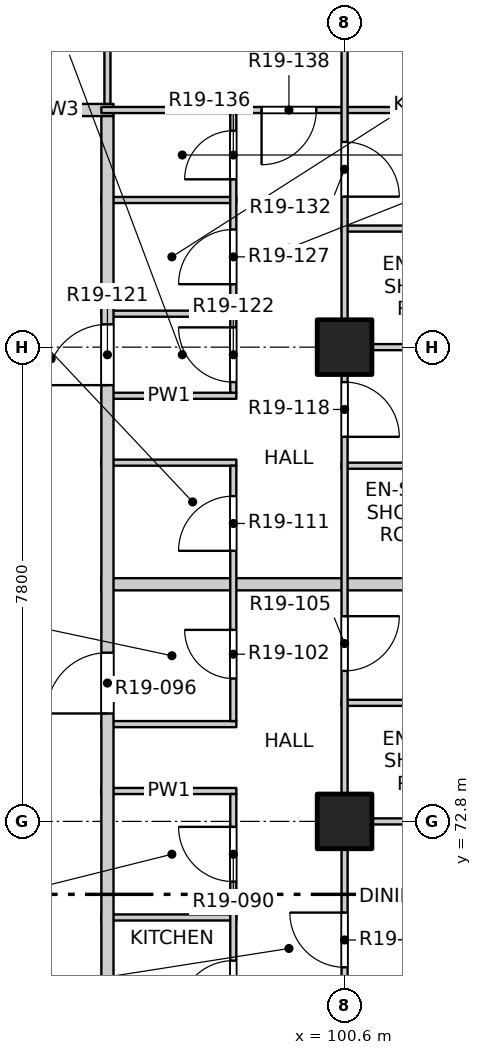
"""IFC4 building model, lengths in metres.
Left out: names, types, materials, properties, quantities, classifications, styles, units other than length and angle.
Written with IfcOpenShell. Run it as: python <this file> out.ifc"""

import sys

from ifc_helpers import new_model, si_unit, direction, frame, frame_2d, origin, origin_2d, place, context, subcontext, project, spatial, rectangle, extrude, element, fill, save


model = new_model("IFC4")
c1 = context("Model", 3, precision=1e-05, world=origin(), true_north=direction((0.0, 1.0)))
c2 = subcontext(c1, "Body", "Model", "MODEL_VIEW")
j1 = project(units=[si_unit("LENGTHUNIT", "METRE"), si_unit("PLANEANGLEUNIT", "RADIAN")], contexts=[c1])
p1 = place(None, origin())
s1 = spatial("IfcSite", under=j1, at=p1, CompositionType="ELEMENT")
p2 = place(p1, origin())
s2 = spatial("IfcBuilding", under=s1, at=p2, CompositionType="ELEMENT")
p3 = place(p2, frame((0.0, 0.0, 197.3)))
s3 = spatial("IfcBuildingStorey", under=s2, at=p3, CompositionType="ELEMENT", Elevation=197.3)
for number, where, z_axis, x_axis in (
    (1, (100.6, 72.8, -0.3), (0.0, 0.0, 1.0), (1.0, 0.0, 0.0)),
    (2, (100.6, 80.6, -0.3), (0.0, 0.0, 1.0), (1.0, 0.0, 0.0)),
):
    element("IfcColumn", number, at=place(p3, frame(where, z_axis=z_axis, x_axis=x_axis)), inside=s3, PredefinedType="COLUMN", context=c2, shape_type="SweptSolid", body=[
        extrude(rectangle(XDim=0.9, YDim=0.9, at=origin_2d()), origin(), (0.0, 0.0, 1.0), 3.45),
    ])
p4 = place(p3, frame((96.6, 71.22, 0.0), z_axis=(0.0, 0.0, 1.0), x_axis=(1.0, 0.0, 0.0)))
e3 = element("IfcWall", 3, at=p4, inside=s3, PredefinedType="PARTITIONING", context=c2, shape_type="SweptSolid", body=[
    extrude(rectangle(XDim=2.22, YDim=0.1, at=frame_2d((1.11, 0.0))), origin(), (0.0, 0.0, 1.0), 3.15),
])
p5 = place(p3, frame((100.55, 72.8, 0.0), z_axis=(0.0, 0.0, 1.0), x_axis=(1.0, 0.0, 0.0)))
e4 = element("IfcWall", 4, at=p5, inside=s3, PredefinedType="PARTITIONING", context=c2, shape_type="SweptSolid", body=[
    extrude(rectangle(XDim=7.55, YDim=0.1, at=frame_2d((3.775, 0.0))), origin(), (0.0, 0.0, 1.0), 3.15),
])
for number, where, z_axis, x_axis in (
    (5, (96.6, 73.3, 0.0), (0.0, 0.0, 1.0), (1.0, 0.0, 0.0)),
    (6, (96.6, 74.4, 0.0), (0.0, 0.0, 1.0), (1.0, 0.0, 0.0)),
):
    element("IfcWall", number, at=place(p3, frame(where, z_axis=z_axis, x_axis=x_axis)), inside=s3, PredefinedType="PARTITIONING", context=c2, shape_type="SweptSolid", body=[
        extrude(rectangle(XDim=2.22, YDim=0.1, at=frame_2d((1.11, 0.0))), origin(), (0.0, 0.0, 1.0), 3.15),
    ])
p6 = place(p3, frame((100.55, 74.75, 0.0), z_axis=(0.0, 0.0, 1.0), x_axis=(1.0, 0.0, 0.0)))
e7 = element("IfcWall", 7, at=p6, inside=s3, PredefinedType="PARTITIONING", context=c2, shape_type="SweptSolid", body=[
    extrude(rectangle(XDim=3.4, YDim=0.1, at=frame_2d((1.7, 0.0))), origin(), (0.0, 0.0, 1.0), 3.15),
])
p7 = place(p3, frame((96.6, 76.7, 0.0), z_axis=(0.0, 0.0, 1.0), x_axis=(1.0, 0.0, 0.0)))
e8 = element("IfcWall", 8, at=p7, inside=s3, PredefinedType="PARTITIONING", context=c2, shape_type="SweptSolid", body=[
    extrude(rectangle(XDim=11.5, YDim=0.2, at=frame_2d((5.75, 0.0))), origin(), (0.0, 0.0, 1.0), 2.55),
])
p8 = place(p3, frame((100.55, 78.65, 0.0), z_axis=(0.0, 0.0, 1.0), x_axis=(1.0, 0.0, 0.0)))
e9 = element("IfcWall", 9, at=p8, inside=s3, PredefinedType="PARTITIONING", context=c2, shape_type="SweptSolid", body=[
    extrude(rectangle(XDim=3.4, YDim=0.1, at=frame_2d((1.7, 0.0))), origin(), (0.0, 0.0, 1.0), 3.15),
])
for number, where, z_axis, x_axis in (
    (10, (96.6, 78.7, 0.0), (0.0, 0.0, 1.0), (1.0, 0.0, 0.0)),
    (11, (96.6, 79.8, 0.0), (0.0, 0.0, 1.0), (1.0, 0.0, 0.0)),
):
    element("IfcWall", number, at=place(p3, frame(where, z_axis=z_axis, x_axis=x_axis)), inside=s3, PredefinedType="PARTITIONING", context=c2, shape_type="SweptSolid", body=[
        extrude(rectangle(XDim=2.22, YDim=0.1, at=frame_2d((1.11, 0.0))), origin(), (0.0, 0.0, 1.0), 3.15),
    ])
p9 = place(p3, frame((100.55, 80.6, 0.0), z_axis=(0.0, 0.0, 1.0), x_axis=(1.0, 0.0, 0.0)))
e12 = element("IfcWall", 12, at=p9, inside=s3, PredefinedType="PARTITIONING", context=c2, shape_type="SweptSolid", body=[
    extrude(rectangle(XDim=7.55, YDim=0.1, at=frame_2d((3.775, 0.0))), origin(), (0.0, 0.0, 1.0), 3.15),
])
p10 = place(p3, frame((96.6, 81.15, 0.0), z_axis=(0.0, 0.0, 1.0), x_axis=(1.0, 0.0, 0.0)))
e13 = element("IfcWall", 13, at=p10, inside=s3, PredefinedType="PARTITIONING", context=c2, shape_type="SweptSolid", body=[
    extrude(rectangle(XDim=2.22, YDim=0.1, at=frame_2d((1.11, 0.0))), origin(), (0.0, 0.0, 1.0), 3.15),
])
p11 = place(p3, frame((100.55, 82.55, 0.0), z_axis=(0.0, 0.0, 1.0), x_axis=(1.0, 0.0, 0.0)))
e14 = element("IfcWall", 14, at=p11, inside=s3, PredefinedType="PARTITIONING", context=c2, shape_type="SweptSolid", body=[
    extrude(rectangle(XDim=3.4, YDim=0.1, at=frame_2d((1.7, 0.0))), origin(), (0.0, 0.0, 1.0), 3.15),
])
p12 = place(p3, frame((96.6, 83.02, 0.0), z_axis=(0.0, 0.0, 1.0), x_axis=(1.0, 0.0, 0.0)))
e15 = element("IfcWall", 15, at=p12, inside=s3, PredefinedType="PARTITIONING", context=c2, shape_type="SweptSolid", body=[
    extrude(rectangle(XDim=2.22, YDim=0.1, at=frame_2d((1.11, 0.0))), origin(), (0.0, 0.0, 1.0), 3.15),
])
p13 = place(p3, frame((94.95, 84.5, 0.0), z_axis=(0.0, 0.0, 1.0), x_axis=(1.0, 0.0, 0.0)))
e16 = element("IfcWall", 16, at=p13, inside=s3, PredefinedType="PARTITIONING", context=c2, shape_type="SweptSolid", body=[
    extrude(rectangle(XDim=1.85, YDim=0.2, at=frame_2d((0.925, 0.0))), origin(), (0.0, 0.0, 1.0), 3.15),
])
p14 = place(p3, frame((96.6, 84.5, 0.0), z_axis=(0.0, 0.0, 1.0), x_axis=(1.0, 0.0, 0.0)))
e17 = element("IfcWall", 17, at=p14, inside=s3, PredefinedType="PARTITIONING", context=c2, shape_type="SweptSolid", body=[
    extrude(rectangle(XDim=11.5, YDim=0.1, at=frame_2d((5.75, 0.0))), origin(), (0.0, 0.0, 1.0), 3.15),
])
p15 = place(p14, frame((2.635, 0.0, 0.0)))
e18 = element("IfcOpeningElement", 18, at=p15, cuts=e17, PredefinedType="OPENING", context=c2, shape_type="SweptSolid", body=[
    extrude(rectangle(XDim=0.9, YDim=2.1, at=frame_2d((0.45, 1.05))), frame((0.0, 0.06, 0.0), z_axis=(0.0, -1.0, 0.0), x_axis=(1.0, 0.0, 0.0)), (0.0, 0.0, 1.0), 0.12),
])
p16 = place(p3, frame((96.7, 49.5, 0.0), z_axis=(0.0, 0.0, 1.0), x_axis=(0.0, 1.0, 0.0)))
e19 = element("IfcWall", 19, at=p16, inside=s3, PredefinedType="PARTITIONING", context=c2, shape_type="SweptSolid", body=[
    extrude(rectangle(XDim=34.9, YDim=0.2, at=frame_2d((17.45, 0.0))), origin(), (0.0, 0.0, 1.0), 3.15),
])
p17 = place(p16, frame((6.525, 0.0, 0.0)))
e20 = element("IfcOpeningElement", 20, at=p17, cuts=e19, PredefinedType="OPENING", context=c2, shape_type="SweptSolid", body=[
    extrude(rectangle(XDim=1.0, YDim=2.1, at=frame_2d((0.5, 1.05))), frame((0.0, 0.11, 0.0), z_axis=(0.0, -1.0, 0.0), x_axis=(1.0, 0.0, 0.0)), (0.0, 0.0, 1.0), 0.22),
])
p18 = place(p16, frame((14.275, 0.0, 0.0)))
e21 = element("IfcOpeningElement", 21, at=p18, cuts=e19, PredefinedType="OPENING", context=c2, shape_type="SweptSolid", body=[
    extrude(rectangle(XDim=1.0, YDim=2.1, at=frame_2d((0.5, 1.05))), frame((0.0, 0.11, 0.0), z_axis=(0.0, -1.0, 0.0), x_axis=(1.0, 0.0, 0.0)), (0.0, 0.0, 1.0), 0.22),
])
p19 = place(p16, frame((25.075, 0.0, 0.0)))
e22 = element("IfcOpeningElement", 22, at=p19, cuts=e19, PredefinedType="OPENING", context=c2, shape_type="SweptSolid", body=[
    extrude(rectangle(XDim=1.0, YDim=2.1, at=frame_2d((0.5, 1.05))), frame((0.0, 0.11, 0.0), z_axis=(0.0, -1.0, 0.0), x_axis=(1.0, 0.0, 0.0)), (0.0, 0.0, 1.0), 0.22),
])
p20 = place(p16, frame((30.475, 0.0, 0.0)))
e23 = element("IfcOpeningElement", 23, at=p20, cuts=e19, PredefinedType="OPENING", context=c2, shape_type="SweptSolid", body=[
    extrude(rectangle(XDim=1.0, YDim=2.1, at=frame_2d((0.5, 1.05))), frame((0.0, 0.11, 0.0), z_axis=(0.0, -1.0, 0.0), x_axis=(1.0, 0.0, 0.0)), (0.0, 0.0, 1.0), 0.22),
])
p21 = place(p3, frame((96.7, 84.6, 0.0), z_axis=(0.0, 0.0, 1.0), x_axis=(0.0, 1.0, 0.0)))
e24 = element("IfcWall", 24, at=p21, inside=s3, PredefinedType="PARTITIONING", context=c2, shape_type="SweptSolid", body=[
    extrude(rectangle(XDim=3.5, YDim=0.1, at=frame_2d((1.75, 0.0))), origin(), (0.0, 0.0, 1.0), 3.15),
])
p22 = place(p21, frame((1.4, 0.0, 0.0)))
e25 = element("IfcOpeningElement", 25, at=p22, cuts=e24, PredefinedType="OPENING", context=c2, shape_type="SweptSolid", body=[
    extrude(rectangle(XDim=0.9, YDim=2.1, at=frame_2d((0.45, 1.05))), frame((0.0, 0.06, 0.0), z_axis=(0.0, -1.0, 0.0), x_axis=(1.0, 0.0, 0.0)), (0.0, 0.0, 1.0), 0.12),
])
p23 = place(p3, frame((98.77, 63.65, 0.0), z_axis=(0.0, 0.0, 1.0), x_axis=(0.0, 1.0, 0.0)))
e26 = element("IfcWall", 26, at=p23, inside=s3, PredefinedType="PARTITIONING", context=c2, shape_type="SweptSolid", body=[
    extrude(rectangle(XDim=9.6, YDim=0.1, at=frame_2d((4.8, 0.0))), origin(), (0.0, 0.0, 1.0), 3.15),
])
p24 = place(p23, frame((0.885, 0.0, 0.0)))
e27 = element("IfcOpeningElement", 27, at=p24, cuts=e26, PredefinedType="OPENING", context=c2, shape_type="SweptSolid", body=[
    extrude(rectangle(XDim=0.9, YDim=2.1, at=frame_2d((0.45, 1.05))), frame((0.0, 0.06, 0.0), z_axis=(0.0, -1.0, 0.0), x_axis=(1.0, 0.0, 0.0)), (0.0, 0.0, 1.0), 0.12),
])
p25 = place(p23, frame((3.535, 0.0, 0.0)))
e28 = element("IfcOpeningElement", 28, at=p25, cuts=e26, PredefinedType="OPENING", context=c2, shape_type="SweptSolid", body=[
    extrude(rectangle(XDim=0.9, YDim=2.1, at=frame_2d((0.45, 1.05))), frame((0.0, 0.06, 0.0), z_axis=(0.0, -1.0, 0.0), x_axis=(1.0, 0.0, 0.0)), (0.0, 0.0, 1.0), 0.12),
])
p26 = place(p23, frame((5.96, 0.0, 0.0)))
e29 = element("IfcOpeningElement", 29, at=p26, cuts=e26, PredefinedType="OPENING", context=c2, shape_type="SweptSolid", body=[
    extrude(rectangle(XDim=0.9, YDim=2.1, at=frame_2d((0.45, 1.05))), frame((0.0, 0.06, 0.0), z_axis=(0.0, -1.0, 0.0), x_axis=(1.0, 0.0, 0.0)), (0.0, 0.0, 1.0), 0.12),
])
p27 = place(p23, frame((8.16, 0.0, 0.0)))
e30 = element("IfcOpeningElement", 30, at=p27, cuts=e26, PredefinedType="OPENING", context=c2, shape_type="SweptSolid", body=[
    extrude(rectangle(XDim=0.9, YDim=2.1, at=frame_2d((0.45, 1.05))), frame((0.0, 0.06, 0.0), z_axis=(0.0, -1.0, 0.0), x_axis=(1.0, 0.0, 0.0)), (0.0, 0.0, 1.0), 0.12),
])
p28 = place(p3, frame((98.77, 74.45, 0.0), z_axis=(0.0, 0.0, 1.0), x_axis=(0.0, 1.0, 0.0)))
e31 = element("IfcWall", 31, at=p28, inside=s3, PredefinedType="PARTITIONING", context=c2, shape_type="SweptSolid", body=[
    extrude(rectangle(XDim=4.2, YDim=0.1, at=frame_2d((2.1, 0.0))), origin(), (0.0, 0.0, 1.0), 3.15),
])
p29 = place(p28, frame((0.7, 0.0, 0.0)))
e32 = element("IfcOpeningElement", 32, at=p29, cuts=e31, PredefinedType="OPENING", context=c2, shape_type="SweptSolid", body=[
    extrude(rectangle(XDim=0.8, YDim=2.1, at=frame_2d((0.4, 1.05))), frame((0.0, 0.06, 0.0), z_axis=(0.0, -1.0, 0.0), x_axis=(1.0, 0.0, 0.0)), (0.0, 0.0, 1.0), 0.12),
])
p30 = place(p28, frame((2.8, 0.0, 0.0)))
e33 = element("IfcOpeningElement", 33, at=p30, cuts=e31, PredefinedType="OPENING", context=c2, shape_type="SweptSolid", body=[
    extrude(rectangle(XDim=0.9, YDim=2.1, at=frame_2d((0.45, 1.05))), frame((0.0, 0.06, 0.0), z_axis=(0.0, -1.0, 0.0), x_axis=(1.0, 0.0, 0.0)), (0.0, 0.0, 1.0), 0.12),
])
p31 = place(p3, frame((98.77, 79.85, 0.0), z_axis=(0.0, 0.0, 1.0), x_axis=(0.0, 1.0, 0.0)))
e34 = element("IfcWall", 34, at=p31, inside=s3, PredefinedType="PARTITIONING", context=c2, shape_type="SweptSolid", body=[
    extrude(rectangle(XDim=4.6, YDim=0.1, at=frame_2d((2.3, 0.0))), origin(), (0.0, 0.0, 1.0), 3.15),
])
p32 = place(p31, frame((0.175, 0.0, 0.0)))
e35 = element("IfcOpeningElement", 35, at=p32, cuts=e34, PredefinedType="OPENING", context=c2, shape_type="SweptSolid", body=[
    extrude(rectangle(XDim=0.9, YDim=2.1, at=frame_2d((0.45, 1.05))), frame((0.0, 0.06, 0.0), z_axis=(0.0, -1.0, 0.0), x_axis=(1.0, 0.0, 0.0)), (0.0, 0.0, 1.0), 0.12),
])
p33 = place(p31, frame((1.785, 0.0, 0.0)))
e36 = element("IfcOpeningElement", 36, at=p33, cuts=e34, PredefinedType="OPENING", context=c2, shape_type="SweptSolid", body=[
    extrude(rectangle(XDim=0.9, YDim=2.1, at=frame_2d((0.45, 1.05))), frame((0.0, 0.06, 0.0), z_axis=(0.0, -1.0, 0.0), x_axis=(1.0, 0.0, 0.0)), (0.0, 0.0, 1.0), 0.12),
])
p34 = place(p31, frame((3.51, 0.0, 0.0)))
e37 = element("IfcOpeningElement", 37, at=p34, cuts=e34, PredefinedType="OPENING", context=c2, shape_type="SweptSolid", body=[
    extrude(rectangle(XDim=0.8, YDim=2.1, at=frame_2d((0.4, 1.05))), frame((0.0, 0.06, 0.0), z_axis=(0.0, -1.0, 0.0), x_axis=(1.0, 0.0, 0.0)), (0.0, 0.0, 1.0), 0.12),
])
p35 = place(p3, frame((100.6, 41.9, 0.0), z_axis=(0.0, 0.0, 1.0), x_axis=(0.0, 1.0, 0.0)))
e38 = element("IfcWall", 38, at=p35, inside=s3, PredefinedType="PARTITIONING", context=c2, shape_type="SweptSolid", body=[
    extrude(rectangle(XDim=46.2, YDim=0.1, at=frame_2d((23.1, 0.0))), origin(), (0.0, 0.0, 1.0), 3.15),
])
p36 = place(p35, frame((1.2, 0.0, 0.0)))
e39 = element("IfcOpeningElement", 39, at=p36, cuts=e38, PredefinedType="OPENING", context=c2, shape_type="SweptSolid", body=[
    extrude(rectangle(XDim=0.9, YDim=2.1, at=frame_2d((0.45, 1.05))), frame((0.0, 0.06, 0.0), z_axis=(0.0, -1.0, 0.0), x_axis=(1.0, 0.0, 0.0)), (0.0, 0.0, 1.0), 0.12),
])
p37 = place(p35, frame((5.1, 0.0, 0.0)))
e40 = element("IfcOpeningElement", 40, at=p37, cuts=e38, PredefinedType="OPENING", context=c2, shape_type="SweptSolid", body=[
    extrude(rectangle(XDim=0.9, YDim=2.1, at=frame_2d((0.45, 1.05))), frame((0.0, 0.06, 0.0), z_axis=(0.0, -1.0, 0.0), x_axis=(1.0, 0.0, 0.0)), (0.0, 0.0, 1.0), 0.12),
])
p38 = place(p35, frame((9.975, 0.0, 0.0)))
e41 = element("IfcOpeningElement", 41, at=p38, cuts=e38, PredefinedType="OPENING", context=c2, shape_type="SweptSolid", body=[
    extrude(rectangle(XDim=0.9, YDim=2.1, at=frame_2d((0.45, 1.05))), frame((0.0, 0.06, 0.0), z_axis=(0.0, -1.0, 0.0), x_axis=(1.0, 0.0, 0.0)), (0.0, 0.0, 1.0), 0.12),
])
p39 = place(p35, frame((12.9, 0.0, 0.0)))
e42 = element("IfcOpeningElement", 42, at=p39, cuts=e38, PredefinedType="OPENING", context=c2, shape_type="SweptSolid", body=[
    extrude(rectangle(XDim=0.9, YDim=2.1, at=frame_2d((0.45, 1.05))), frame((0.0, 0.06, 0.0), z_axis=(0.0, -1.0, 0.0), x_axis=(1.0, 0.0, 0.0)), (0.0, 0.0, 1.0), 0.12),
])
p40 = place(p35, frame((17.775, 0.0, 0.0)))
e43 = element("IfcOpeningElement", 43, at=p40, cuts=e38, PredefinedType="OPENING", context=c2, shape_type="SweptSolid", body=[
    extrude(rectangle(XDim=0.9, YDim=2.1, at=frame_2d((0.45, 1.05))), frame((0.0, 0.06, 0.0), z_axis=(0.0, -1.0, 0.0), x_axis=(1.0, 0.0, 0.0)), (0.0, 0.0, 1.0), 0.12),
])
p41 = place(p35, frame((20.7, 0.0, 0.0)))
e44 = element("IfcOpeningElement", 44, at=p41, cuts=e38, PredefinedType="OPENING", context=c2, shape_type="SweptSolid", body=[
    extrude(rectangle(XDim=0.9, YDim=2.1, at=frame_2d((0.45, 1.05))), frame((0.0, 0.06, 0.0), z_axis=(0.0, -1.0, 0.0), x_axis=(1.0, 0.0, 0.0)), (0.0, 0.0, 1.0), 0.12),
])
p42 = place(p35, frame((25.575, 0.0, 0.0)))
e45 = element("IfcOpeningElement", 45, at=p42, cuts=e38, PredefinedType="OPENING", context=c2, shape_type="SweptSolid", body=[
    extrude(rectangle(XDim=0.9, YDim=2.1, at=frame_2d((0.45, 1.05))), frame((0.0, 0.06, 0.0), z_axis=(0.0, -1.0, 0.0), x_axis=(1.0, 0.0, 0.0)), (0.0, 0.0, 1.0), 0.12),
])
p43 = place(p35, frame((28.5, 0.0, 0.0)))
e46 = element("IfcOpeningElement", 46, at=p43, cuts=e38, PredefinedType="OPENING", context=c2, shape_type="SweptSolid", body=[
    extrude(rectangle(XDim=0.9, YDim=2.1, at=frame_2d((0.45, 1.05))), frame((0.0, 0.06, 0.0), z_axis=(0.0, -1.0, 0.0), x_axis=(1.0, 0.0, 0.0)), (0.0, 0.0, 1.0), 0.12),
])
p44 = place(p35, frame((33.375, 0.0, 0.0)))
e47 = element("IfcOpeningElement", 47, at=p44, cuts=e38, PredefinedType="OPENING", context=c2, shape_type="SweptSolid", body=[
    extrude(rectangle(XDim=0.9, YDim=2.1, at=frame_2d((0.45, 1.05))), frame((0.0, 0.06, 0.0), z_axis=(0.0, -1.0, 0.0), x_axis=(1.0, 0.0, 0.0)), (0.0, 0.0, 1.0), 0.12),
])
p45 = place(p35, frame((37.225, 0.0, 0.0)))
e48 = element("IfcOpeningElement", 48, at=p45, cuts=e38, PredefinedType="OPENING", context=c2, shape_type="SweptSolid", body=[
    extrude(rectangle(XDim=0.9, YDim=2.1, at=frame_2d((0.45, 1.05))), frame((0.0, 0.06, 0.0), z_axis=(0.0, -1.0, 0.0), x_axis=(1.0, 0.0, 0.0)), (0.0, 0.0, 1.0), 0.12),
])
p46 = place(p35, frame((41.175, 0.0, 0.0)))
e49 = element("IfcOpeningElement", 49, at=p46, cuts=e38, PredefinedType="OPENING", context=c2, shape_type="SweptSolid", body=[
    extrude(rectangle(XDim=0.9, YDim=2.1, at=frame_2d((0.45, 1.05))), frame((0.0, 0.06, 0.0), z_axis=(0.0, -1.0, 0.0), x_axis=(1.0, 0.0, 0.0)), (0.0, 0.0, 1.0), 0.12),
])
p47 = place(p35, frame((44.1, 0.0, 0.0)))
e50 = element("IfcOpeningElement", 50, at=p47, cuts=e38, PredefinedType="OPENING", context=c2, shape_type="SweptSolid", body=[
    extrude(rectangle(XDim=0.9, YDim=2.1, at=frame_2d((0.45, 1.05))), frame((0.0, 0.06, 0.0), z_axis=(0.0, -1.0, 0.0), x_axis=(1.0, 0.0, 0.0)), (0.0, 0.0, 1.0), 0.12),
])
p48 = place(p26, origin())
e51 = element("IfcDoor", 51, at=p48, inside=s3, OperationType="SINGLE_SWING_LEFT", PredefinedType="DOOR", context=c2, shape_type="SweptSolid", body=[
    extrude(rectangle(XDim=0.9, YDim=2.1, at=frame_2d((0.45, 1.05))), frame((0.0, 0.025, 0.0), z_axis=(0.0, -1.0, 0.0), x_axis=(1.0, 0.0, 0.0)), (0.0, 0.0, 1.0), 0.05),
])
fill(e29, e51)
p49 = place(p43, origin())
e52 = element("IfcDoor", 52, at=p49, inside=s3, OperationType="SINGLE_SWING_RIGHT", PredefinedType="DOOR", context=c2, shape_type="SweptSolid", body=[
    extrude(rectangle(XDim=0.9, YDim=2.1, at=frame_2d((0.45, 1.05))), frame((0.0, 0.025, 0.0), z_axis=(0.0, -1.0, 0.0), x_axis=(1.0, 0.0, 0.0)), (0.0, 0.0, 1.0), 0.05),
])
fill(e46, e52)
p50 = place(p27, origin())
e53 = element("IfcDoor", 53, at=p50, inside=s3, OperationType="SINGLE_SWING_RIGHT", PredefinedType="DOOR", context=c2, shape_type="SweptSolid", body=[
    extrude(rectangle(XDim=0.9, YDim=2.1, at=frame_2d((0.45, 1.05))), frame((0.0, 0.025, 0.0), z_axis=(0.0, -1.0, 0.0), x_axis=(1.0, 0.0, 0.0)), (0.0, 0.0, 1.0), 0.05),
])
fill(e30, e53)
p51 = place(p19, origin())
e54 = element("IfcDoor", 54, at=p51, inside=s3, OperationType="SINGLE_SWING_LEFT", PredefinedType="DOOR", context=c2, shape_type="SweptSolid", body=[
    extrude(rectangle(XDim=1.0, YDim=2.1, at=frame_2d((0.5, 1.05))), frame((0.0, 0.025, 0.0), z_axis=(0.0, -1.0, 0.0), x_axis=(1.0, 0.0, 0.0)), (0.0, 0.0, 1.0), 0.05),
])
fill(e22, e54)
p52 = place(p29, origin())
e55 = element("IfcDoor", 55, at=p52, inside=s3, OperationType="SINGLE_SWING_RIGHT", PredefinedType="DOOR", context=c2, shape_type="SweptSolid", body=[
    extrude(rectangle(XDim=0.8, YDim=2.1, at=frame_2d((0.4, 1.05))), frame((0.0, 0.025, 0.0), z_axis=(0.0, -1.0, 0.0), x_axis=(1.0, 0.0, 0.0)), (0.0, 0.0, 1.0), 0.05),
])
fill(e32, e55)
p53 = place(p44, origin())
e56 = element("IfcDoor", 56, at=p53, inside=s3, OperationType="SINGLE_SWING_LEFT", PredefinedType="DOOR", context=c2, shape_type="SweptSolid", body=[
    extrude(rectangle(XDim=0.9, YDim=2.1, at=frame_2d((0.45, 1.05))), frame((0.0, 0.025, 0.0), z_axis=(0.0, -1.0, 0.0), x_axis=(1.0, 0.0, 0.0)), (0.0, 0.0, 1.0), 0.05),
])
fill(e47, e56)
p54 = place(p30, origin())
e57 = element("IfcDoor", 57, at=p54, inside=s3, OperationType="SINGLE_SWING_LEFT", PredefinedType="DOOR", context=c2, shape_type="SweptSolid", body=[
    extrude(rectangle(XDim=0.9, YDim=2.1, at=frame_2d((0.45, 1.05))), frame((0.0, 0.025, 0.0), z_axis=(0.0, -1.0, 0.0), x_axis=(1.0, 0.0, 0.0)), (0.0, 0.0, 1.0), 0.05),
])
fill(e33, e57)
p55 = place(p45, origin())
e58 = element("IfcDoor", 58, at=p55, inside=s3, OperationType="SINGLE_SWING_RIGHT", PredefinedType="DOOR", context=c2, shape_type="SweptSolid", body=[
    extrude(rectangle(XDim=0.9, YDim=2.1, at=frame_2d((0.45, 1.05))), frame((0.0, 0.025, 0.0), z_axis=(0.0, -1.0, 0.0), x_axis=(1.0, 0.0, 0.0)), (0.0, 0.0, 1.0), 0.05),
])
fill(e48, e58)
p56 = place(p20, origin())
e59 = element("IfcDoor", 59, at=p56, inside=s3, OperationType="SINGLE_SWING_LEFT", PredefinedType="DOOR", context=c2, shape_type="SweptSolid", body=[
    extrude(rectangle(XDim=1.0, YDim=2.1, at=frame_2d((0.5, 1.05))), frame((0.0, 0.025, 0.0), z_axis=(0.0, -1.0, 0.0), x_axis=(1.0, 0.0, 0.0)), (0.0, 0.0, 1.0), 0.05),
])
fill(e23, e59)
p57 = place(p32, origin())
e60 = element("IfcDoor", 60, at=p57, inside=s3, OperationType="SINGLE_SWING_RIGHT", PredefinedType="DOOR", context=c2, shape_type="SweptSolid", body=[
    extrude(rectangle(XDim=0.9, YDim=2.1, at=frame_2d((0.45, 1.05))), frame((0.0, 0.025, 0.0), z_axis=(0.0, -1.0, 0.0), x_axis=(1.0, 0.0, 0.0)), (0.0, 0.0, 1.0), 0.05),
])
fill(e35, e60)
p58 = place(p33, origin())
e61 = element("IfcDoor", 61, at=p58, inside=s3, OperationType="SINGLE_SWING_LEFT", PredefinedType="DOOR", context=c2, shape_type="SweptSolid", body=[
    extrude(rectangle(XDim=0.9, YDim=2.1, at=frame_2d((0.45, 1.05))), frame((0.0, 0.025, 0.0), z_axis=(0.0, -1.0, 0.0), x_axis=(1.0, 0.0, 0.0)), (0.0, 0.0, 1.0), 0.05),
])
fill(e36, e61)
p59 = place(p46, origin())
e62 = element("IfcDoor", 62, at=p59, inside=s3, OperationType="SINGLE_SWING_RIGHT", PredefinedType="DOOR", context=c2, shape_type="SweptSolid", body=[
    extrude(rectangle(XDim=0.9, YDim=2.1, at=frame_2d((0.45, 1.05))), frame((0.0, 0.025, 0.0), z_axis=(0.0, -1.0, 0.0), x_axis=(1.0, 0.0, 0.0)), (0.0, 0.0, 1.0), 0.05),
])
fill(e49, e62)
p60 = place(p34, origin())
e63 = element("IfcDoor", 63, at=p60, inside=s3, OperationType="SINGLE_SWING_LEFT", PredefinedType="DOOR", context=c2, shape_type="SweptSolid", body=[
    extrude(rectangle(XDim=0.8, YDim=2.1, at=frame_2d((0.4, 1.05))), frame((0.0, 0.025, 0.0), z_axis=(0.0, -1.0, 0.0), x_axis=(1.0, 0.0, 0.0)), (0.0, 0.0, 1.0), 0.05),
])
fill(e37, e63)
p61 = place(p15, origin())
e64 = element("IfcDoor", 64, at=p61, inside=s3, OperationType="SINGLE_SWING_RIGHT", PredefinedType="DOOR", context=c2, shape_type="SweptSolid", body=[
    extrude(rectangle(XDim=0.9, YDim=2.1, at=frame_2d((0.45, 1.05))), frame((0.0, 0.025, 0.0), z_axis=(0.0, -1.0, 0.0), x_axis=(1.0, 0.0, 0.0)), (0.0, 0.0, 1.0), 0.05),
])
fill(e18, e64)
save(model, sys.argv[1])
